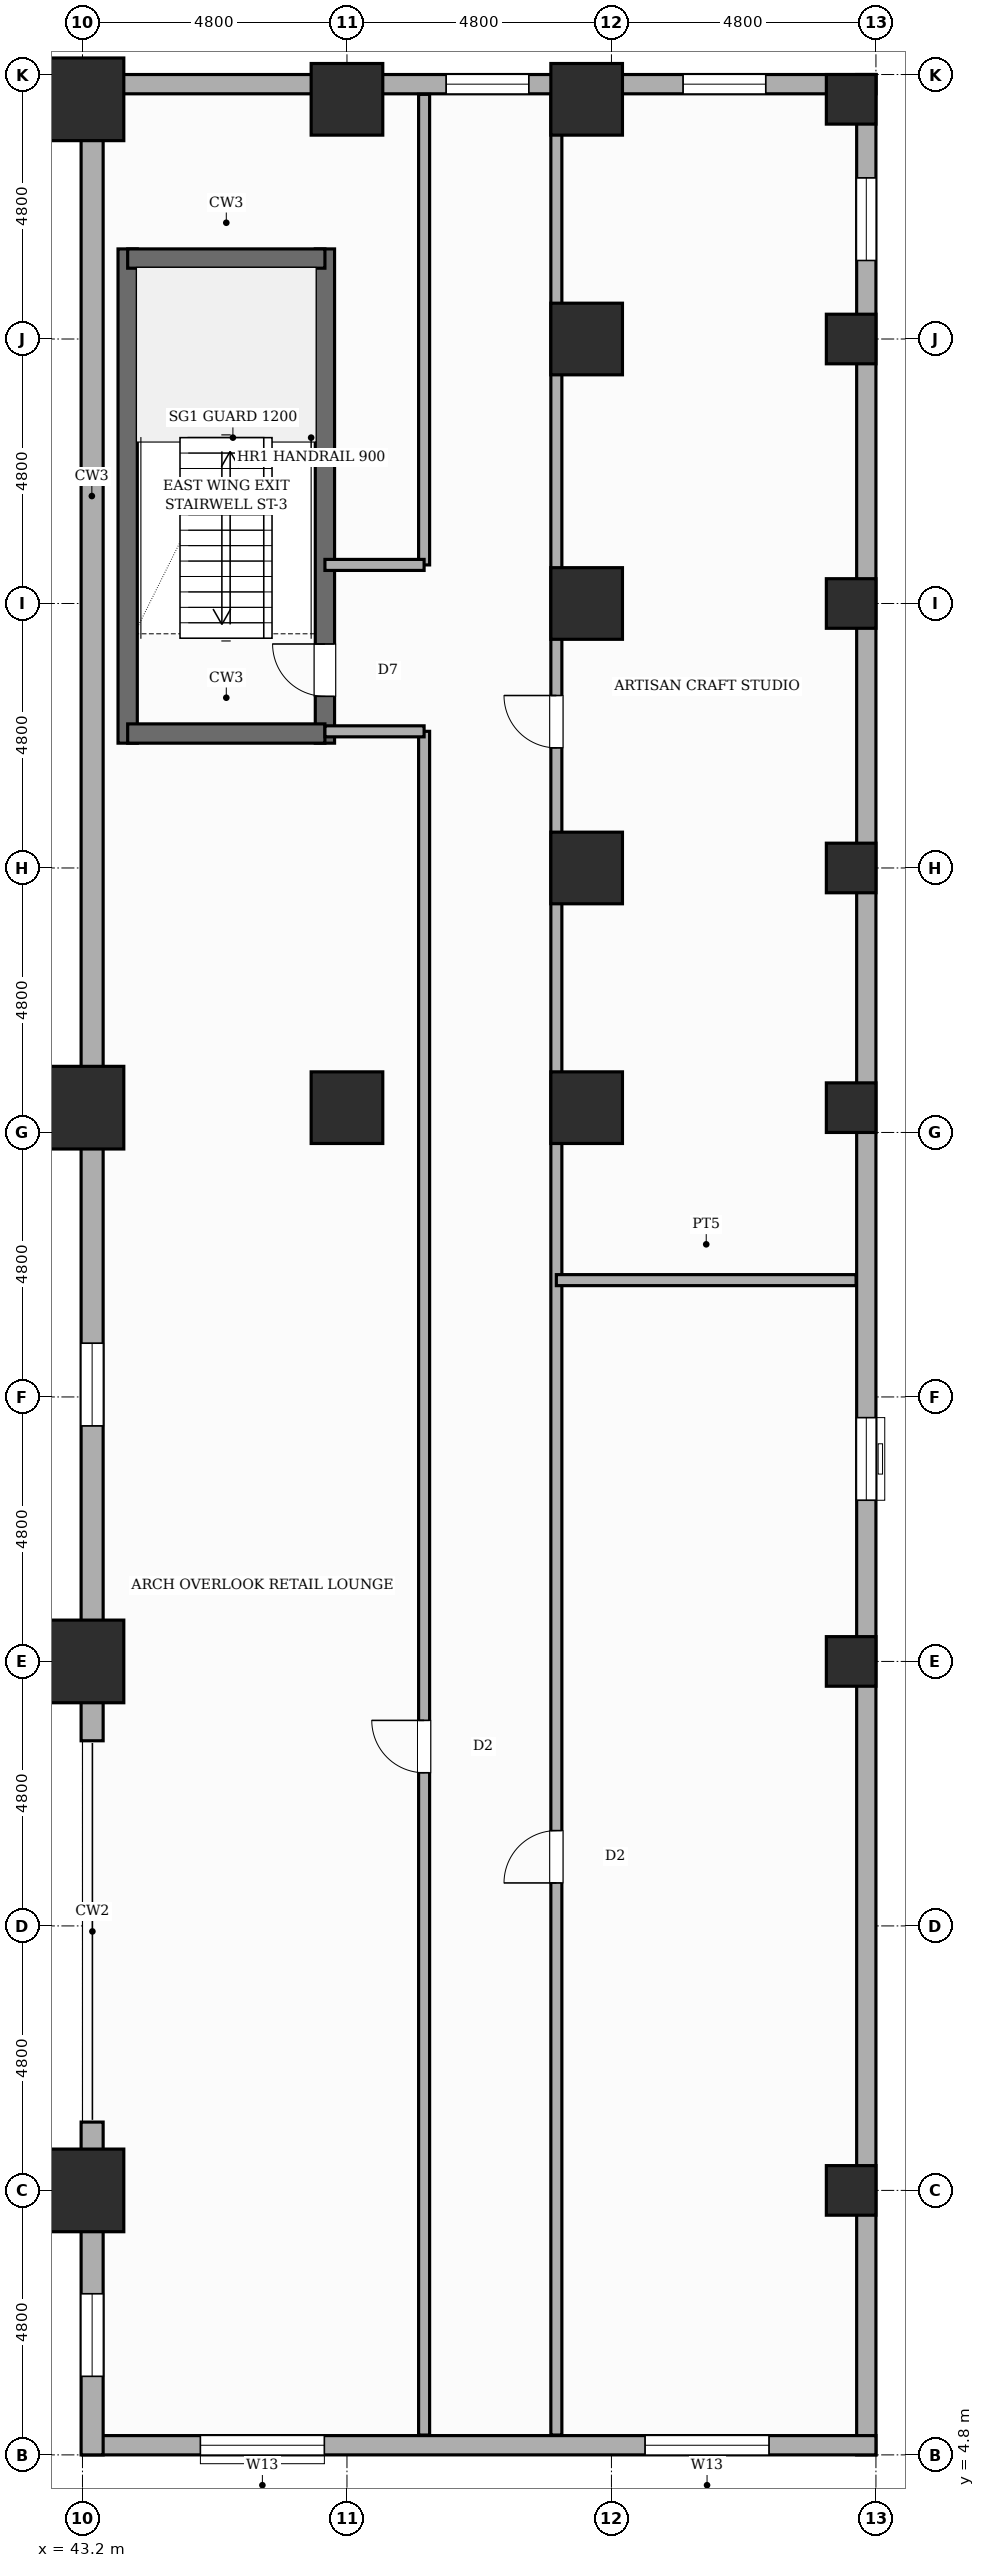
"""IFC4 building model, lengths in metres.
Left out: names, types, materials, properties, quantities, classifications, styles, units other than length and angle.
Written with IfcOpenShell. Run it as: python <this file> out.ifc"""

import sys

from ifc_helpers import new_model, si_unit, direction, frame, frame_2d, origin, origin_2d, place, context, subcontext, project, spatial, rectangle, circle, extrude, element, fill, save


model = new_model("IFC4")
c1 = context("Model", 3, precision=1e-05, world=origin(), true_north=direction((0.0, 1.0)))
c2 = subcontext(c1, "Body", "Model", "MODEL_VIEW")
j1 = project(units=[si_unit("LENGTHUNIT", "METRE"), si_unit("PLANEANGLEUNIT", "RADIAN")], contexts=[c1])
p1 = place(None, origin())
s1 = spatial("IfcSite", under=j1, at=p1, CompositionType="ELEMENT")
p2 = place(p1, origin())
s2 = spatial("IfcBuilding", under=s1, at=p2, CompositionType="ELEMENT")
p3 = place(p2, frame((0.0, 0.0, 5.2)))
s3 = spatial("IfcBuildingStorey", under=s2, at=p3, CompositionType="ELEMENT", Elevation=5.2)
p4 = place(p3, frame((44.02, 35.865, 0.0), z_axis=(0.0, 0.0, 1.0), x_axis=(0.0, 1.0, 0.0)))
e1 = element("IfcWall", 1, at=p4, inside=s3, PredefinedType="SHEAR", context=c2, shape_type="SweptSolid", body=[
    extrude(rectangle(XDim=8.97, YDim=0.35, at=frame_2d((4.485, 0.0))), origin(), (0.0, 0.0, 1.0), 4.8),
])
p5 = place(p3, frame((47.6, 35.865, 0.0), z_axis=(0.0, 0.0, 1.0), x_axis=(0.0, 1.0, 0.0)))
e2 = element("IfcWall", 2, at=p5, inside=s3, PredefinedType="SHEAR", context=c2, shape_type="SweptSolid", body=[
    extrude(rectangle(XDim=8.97, YDim=0.35, at=frame_2d((4.485, 0.0))), origin(), (0.0, 0.0, 1.0), 4.8),
])
p6 = place(p5, frame((0.85, 0.0, 0.0)))
e3 = element("IfcOpeningElement", 3, at=p6, cuts=e2, PredefinedType="OPENING", context=c2, shape_type="SweptSolid", body=[
    extrude(rectangle(XDim=0.95, YDim=2.1, at=frame_2d((0.475, 1.05))), frame((0.0, 0.185, 0.0), z_axis=(0.0, -1.0, 0.0), x_axis=(1.0, 0.0, 0.0)), (0.0, 0.0, 1.0), 0.37),
])
for number, where, z_axis, x_axis in (
    (4, (44.02, 36.04, 0.0), (0.0, 0.0, 1.0), (1.0, 0.0, 0.0)),
    (5, (44.02, 44.66, 0.0), (0.0, 0.0, 1.0), (1.0, 0.0, 0.0)),
):
    element("IfcWall", number, at=place(p3, frame(where, z_axis=z_axis, x_axis=x_axis)), inside=s3, PredefinedType="SHEAR", context=c2, shape_type="SweptSolid", body=[
        extrude(rectangle(XDim=3.58, YDim=0.35, at=frame_2d((1.79, 0.0))), origin(), (0.0, 0.0, 1.0), 4.8),
    ])
for number, where, z_axis, x_axis in (
    (6, (43.2, 9.6, 0.0), (0.0, 0.0, 1.0), (1.0, 0.0, 0.0)),
    (7, (43.2, 19.2, 0.0), (0.0, 0.0, 1.0), (1.0, 0.0, 0.0)),
    (8, (43.2, 29.25, 0.0), (0.0, 0.0, 1.0), (1.0, 0.0, 0.0)),
    (9, (43.2, 47.55, 0.0), (0.0, 0.0, 1.0), (1.0, 0.0, 0.0)),
):
    element("IfcColumn", number, at=place(p3, frame(where, z_axis=z_axis, x_axis=x_axis)), inside=s3, PredefinedType="USERDEFINED", context=c2, shape_type="SweptSolid", body=[
        extrude(rectangle(XDim=1.5, YDim=1.5, at=origin_2d()), origin(), (0.0, 0.0, 1.0), 4.8),
    ])
for number, where, z_axis, x_axis in (
    (10, (48.0, 29.25, 0.0), (0.0, 0.0, 1.0), (1.0, 0.0, 0.0)),
    (11, (48.0, 47.55, 0.0), (0.0, 0.0, 1.0), (1.0, 0.0, 0.0)),
    (12, (52.35, 29.25, 0.0), (0.0, 0.0, 1.0), (1.0, 0.0, 0.0)),
    (13, (52.35, 33.6, 0.0), (0.0, 0.0, 1.0), (1.0, 0.0, 0.0)),
    (14, (52.35, 38.4, 0.0), (0.0, 0.0, 1.0), (1.0, 0.0, 0.0)),
    (15, (52.35, 43.2, 0.0), (0.0, 0.0, 1.0), (1.0, 0.0, 0.0)),
    (16, (52.35, 47.55, 0.0), (0.0, 0.0, 1.0), (1.0, 0.0, 0.0)),
):
    element("IfcColumn", number, at=place(p3, frame(where, z_axis=z_axis, x_axis=x_axis)), inside=s3, PredefinedType="COLUMN", context=c2, shape_type="SweptSolid", body=[
        extrude(rectangle(XDim=1.3, YDim=1.3, at=origin_2d()), origin(), (0.0, 0.0, 1.0), 4.8),
    ])
for number, where, z_axis, x_axis in (
    (17, (57.15, 9.6, 0.0), (0.0, 0.0, 1.0), (1.0, 0.0, 0.0)),
    (18, (57.15, 19.2, 0.0), (0.0, 0.0, 1.0), (1.0, 0.0, 0.0)),
    (19, (57.15, 29.25, 0.0), (0.0, 0.0, 1.0), (1.0, 0.0, 0.0)),
    (20, (57.15, 33.6, 0.0), (0.0, 0.0, 1.0), (1.0, 0.0, 0.0)),
    (21, (57.15, 38.4, 0.0), (0.0, 0.0, 1.0), (1.0, 0.0, 0.0)),
    (22, (57.15, 43.2, 0.0), (0.0, 0.0, 1.0), (1.0, 0.0, 0.0)),
    (23, (57.15, 47.55, 0.0), (0.0, 0.0, 1.0), (1.0, 0.0, 0.0)),
):
    element("IfcColumn", number, at=place(p3, frame(where, z_axis=z_axis, x_axis=x_axis)), inside=s3, PredefinedType="COLUMN", context=c2, shape_type="SweptSolid", body=[
        extrude(circle(Radius=0.45, at=origin_2d()), origin(), (0.0, 0.0, 1.0), 4.8),
    ])
p7 = place(p3, frame((43.2, 47.825, 0.0), z_axis=(0.0, 0.0, 1.0), x_axis=(1.0, 0.0, 0.0)))
e24 = element("IfcWall", 24, at=p7, inside=s3, PredefinedType="STANDARD", context=c2, shape_type="SweptSolid", body=[
    extrude(rectangle(XDim=14.4, YDim=0.35, at=frame_2d((7.2, 0.0))), origin(), (0.0, 0.0, 1.0), 3.6),
])
p8 = place(p7, frame((6.6, 0.0, 0.85)))
e25 = element("IfcOpeningElement", 25, at=p8, cuts=e24, PredefinedType="OPENING", context=c2, shape_type="SweptSolid", body=[
    extrude(rectangle(XDim=1.5, YDim=2.1, at=frame_2d((0.75, 1.05))), frame((0.0, 0.185, 0.0), z_axis=(0.0, -1.0, 0.0), x_axis=(1.0, 0.0, 0.0)), (0.0, 0.0, 1.0), 0.37),
])
p9 = place(p7, frame((10.9, 0.0, 0.85)))
e26 = element("IfcOpeningElement", 26, at=p9, cuts=e24, PredefinedType="OPENING", context=c2, shape_type="SweptSolid", body=[
    extrude(rectangle(XDim=1.5, YDim=2.1, at=frame_2d((0.75, 1.05))), frame((0.0, 0.185, 0.0), z_axis=(0.0, -1.0, 0.0), x_axis=(1.0, 0.0, 0.0)), (0.0, 0.0, 1.0), 0.37),
])
p10 = place(p3, frame((57.425, 48.0, 0.0), z_axis=(0.0, 0.0, 1.0), x_axis=(0.0, -1.0, 0.0)))
e27 = element("IfcWall", 27, at=p10, inside=s3, PredefinedType="STANDARD", context=c2, shape_type="SweptSolid", body=[
    extrude(rectangle(XDim=43.2, YDim=0.35, at=frame_2d((21.6, 0.0))), origin(), (0.0, 0.0, 1.0), 3.6),
])
p11 = place(p10, frame((24.375, 0.0, 0.85)))
e28 = element("IfcOpeningElement", 28, at=p11, cuts=e27, PredefinedType="OPENING", context=c2, shape_type="SweptSolid", body=[
    extrude(rectangle(XDim=1.5, YDim=2.1, at=frame_2d((0.75, 1.05))), frame((0.0, 0.185, 0.0), z_axis=(0.0, -1.0, 0.0), x_axis=(1.0, 0.0, 0.0)), (0.0, 0.0, 1.0), 0.37),
])
p12 = place(p10, frame((1.875, 0.0, 0.85)))
e29 = element("IfcOpeningElement", 29, at=p12, cuts=e27, PredefinedType="OPENING", context=c2, shape_type="SweptSolid", body=[
    extrude(rectangle(XDim=1.5, YDim=2.1, at=frame_2d((0.75, 1.05))), frame((0.0, 0.185, 0.0), z_axis=(0.0, -1.0, 0.0), x_axis=(1.0, 0.0, 0.0)), (0.0, 0.0, 1.0), 0.37),
])
p13 = place(p3, frame((57.6, 4.975, 0.0), z_axis=(0.0, 0.0, 1.0), x_axis=(-1.0, 0.0, 0.0)))
e30 = element("IfcWall", 30, at=p13, inside=s3, PredefinedType="STANDARD", context=c2, shape_type="SweptSolid", body=[
    extrude(rectangle(XDim=14.4, YDim=0.35, at=frame_2d((7.2, 0.0))), origin(), (0.0, 0.0, 1.0), 4.52),
])
p14 = place(p13, frame((1.94, 0.0, 0.85)))
e31 = element("IfcOpeningElement", 31, at=p14, cuts=e30, PredefinedType="OPENING", context=c2, shape_type="SweptSolid", body=[
    extrude(rectangle(XDim=2.25, YDim=2.85, at=frame_2d((1.125, 1.425))), frame((0.0, 0.185, 0.0), z_axis=(0.0, -1.0, 0.0), x_axis=(1.0, 0.0, 0.0)), (0.0, 0.0, 1.0), 0.37),
])
p15 = place(p13, frame((10.01, 0.0, 0.85)))
e32 = element("IfcOpeningElement", 32, at=p15, cuts=e30, PredefinedType="OPENING", context=c2, shape_type="SweptSolid", body=[
    extrude(rectangle(XDim=2.25, YDim=2.85, at=frame_2d((1.125, 1.425))), frame((0.0, 0.185, 0.0), z_axis=(0.0, -1.0, 0.0), x_axis=(1.0, 0.0, 0.0)), (0.0, 0.0, 1.0), 0.37),
])
p16 = place(p3, frame((43.375, 4.8, 0.0), z_axis=(0.0, 0.0, 1.0), x_axis=(0.0, 1.0, 0.0)))
e33 = element("IfcWall", 33, at=p16, inside=s3, PredefinedType="SOLIDWALL", context=c2, shape_type="SweptSolid", body=[
    extrude(rectangle(XDim=6.04, YDim=0.4, at=frame_2d((3.02, 0.0))), origin(), (0.0, 0.0, 1.0), 3.6),
])
p17 = place(p16, frame((1.425, 0.0, 0.85)))
e34 = element("IfcOpeningElement", 34, at=p17, cuts=e33, PredefinedType="OPENING", context=c2, shape_type="SweptSolid", body=[
    extrude(rectangle(XDim=1.5, YDim=2.1, at=frame_2d((0.75, 1.05))), frame((0.0, 0.21, 0.0), z_axis=(0.0, -1.0, 0.0), x_axis=(1.0, 0.0, 0.0)), (0.0, 0.0, 1.0), 0.42),
])
p18 = place(p3, frame((43.375, 17.76, 0.0), z_axis=(0.0, 0.0, 1.0), x_axis=(0.0, 1.0, 0.0)))
e35 = element("IfcWall", 35, at=p18, inside=s3, PredefinedType="SOLIDWALL", context=c2, shape_type="SweptSolid", body=[
    extrude(rectangle(XDim=30.24, YDim=0.4, at=frame_2d((15.12, 0.0))), origin(), (0.0, 0.0, 1.0), 3.6),
])
p19 = place(p18, frame((5.715, 0.0, 0.85)))
e36 = element("IfcOpeningElement", 36, at=p19, cuts=e35, PredefinedType="OPENING", context=c2, shape_type="SweptSolid", body=[
    extrude(rectangle(XDim=1.5, YDim=2.1, at=frame_2d((0.75, 1.05))), frame((0.0, 0.21, 0.0), z_axis=(0.0, -1.0, 0.0), x_axis=(1.0, 0.0, 0.0)), (0.0, 0.0, 1.0), 0.42),
])
p20 = place(p3, frame((49.4, 5.16, 0.0), z_axis=(0.0, 0.0, 1.0), x_axis=(0.0, 1.0, 0.0)))
e37 = element("IfcWall", 37, at=p20, inside=s3, PredefinedType="PARTITIONING", context=c2, shape_type="SweptSolid", body=[
    extrude(rectangle(XDim=30.92, YDim=0.2, at=frame_2d((15.46, 0.0))), origin(), (0.0, 0.0, 1.0), 4.52),
])
p21 = place(p20, frame((12.02, 0.0, 0.0)))
e38 = element("IfcOpeningElement", 38, at=p21, cuts=e37, PredefinedType="OPENING", context=c2, shape_type="SweptSolid", body=[
    extrude(rectangle(XDim=0.95, YDim=2.15, at=frame_2d((0.475, 1.075))), frame((0.0, 0.11, 0.0), z_axis=(0.0, -1.0, 0.0), x_axis=(1.0, 0.0, 0.0)), (0.0, 0.0, 1.0), 0.22),
])
p22 = place(p3, frame((49.4, 39.1, 0.0), z_axis=(0.0, 0.0, 1.0), x_axis=(0.0, 1.0, 0.0)))
e39 = element("IfcWall", 39, at=p22, inside=s3, PredefinedType="PARTITIONING", context=c2, shape_type="SweptSolid", body=[
    extrude(rectangle(XDim=8.54, YDim=0.2, at=frame_2d((4.27, 0.0))), origin(), (0.0, 0.0, 1.0), 4.52),
])
for number, where, z_axis, x_axis in (
    (40, (47.6, 36.08, 0.0), (0.0, 0.0, 1.0), (1.0, 0.0, 0.0)),
    (41, (47.6, 39.1, 0.0), (0.0, 0.0, 1.0), (1.0, 0.0, 0.0)),
):
    element("IfcWall", number, at=place(p3, frame(where, z_axis=z_axis, x_axis=x_axis)), inside=s3, PredefinedType="PARTITIONING", context=c2, shape_type="SweptSolid", body=[
        extrude(rectangle(XDim=1.8, YDim=0.2, at=frame_2d((0.9, 0.0))), origin(), (0.0, 0.0, 1.0), 4.52),
    ])
p23 = place(p3, frame((51.8, 5.16, 0.0), z_axis=(0.0, 0.0, 1.0), x_axis=(0.0, 1.0, 0.0)))
e42 = element("IfcWall", 42, at=p23, inside=s3, PredefinedType="PARTITIONING", context=c2, shape_type="SweptSolid", body=[
    extrude(rectangle(XDim=42.48, YDim=0.2, at=frame_2d((21.24, 0.0))), origin(), (0.0, 0.0, 1.0), 4.52),
])
p24 = place(p23, frame((10.02, 0.0, 0.0)))
e43 = element("IfcOpeningElement", 43, at=p24, cuts=e42, PredefinedType="OPENING", context=c2, shape_type="SweptSolid", body=[
    extrude(rectangle(XDim=0.95, YDim=2.15, at=frame_2d((0.475, 1.075))), frame((0.0, 0.11, 0.0), z_axis=(0.0, -1.0, 0.0), x_axis=(1.0, 0.0, 0.0)), (0.0, 0.0, 1.0), 0.22),
])
p25 = place(p23, frame((30.62, 0.0, 0.0)))
e44 = element("IfcOpeningElement", 44, at=p25, cuts=e42, PredefinedType="OPENING", context=c2, shape_type="SweptSolid", body=[
    extrude(rectangle(XDim=0.95, YDim=2.15, at=frame_2d((0.475, 1.075))), frame((0.0, 0.11, 0.0), z_axis=(0.0, -1.0, 0.0), x_axis=(1.0, 0.0, 0.0)), (0.0, 0.0, 1.0), 0.22),
])
p26 = place(p3, frame((51.8, 26.12, 0.0), z_axis=(0.0, 0.0, 1.0), x_axis=(1.0, 0.0, 0.0)))
e45 = element("IfcWall", 45, at=p26, inside=s3, PredefinedType="SOLIDWALL", context=c2, shape_type="SweptSolid", body=[
    extrude(rectangle(XDim=5.44, YDim=0.2, at=frame_2d((2.72, 0.0))), origin(), (0.0, 0.0, 1.0), 4.52),
])
p27 = place(p8, origin())
e46 = element("IfcWindow", 46, at=p27, inside=s3, PartitioningType="SINGLE_PANEL", PredefinedType="WINDOW", context=c2, shape_type="SweptSolid", body=[
    extrude(rectangle(XDim=1.5, YDim=2.1, at=frame_2d((0.75, 1.05))), frame((0.0, 0.03, 0.0), z_axis=(0.0, -1.0, 0.0), x_axis=(1.0, 0.0, 0.0)), (0.0, 0.0, 1.0), 0.06),
])
fill(e25, e46)
p28 = place(p9, origin())
e47 = element("IfcWindow", 47, at=p28, inside=s3, PartitioningType="SINGLE_PANEL", PredefinedType="WINDOW", context=c2, shape_type="SweptSolid", body=[
    extrude(rectangle(XDim=1.5, YDim=2.1, at=frame_2d((0.75, 1.05))), frame((0.0, 0.03, 0.0), z_axis=(0.0, -1.0, 0.0), x_axis=(1.0, 0.0, 0.0)), (0.0, 0.0, 1.0), 0.06),
])
fill(e26, e47)
p29 = place(p11, origin())
e48 = element("IfcWindow", 48, at=p29, inside=s3, PartitioningType="SINGLE_PANEL", PredefinedType="WINDOW", context=c2, shape_type="SweptSolid", body=[
    extrude(rectangle(XDim=1.5, YDim=2.1, at=frame_2d((0.75, 1.05))), frame((0.0, 0.03, 0.0), z_axis=(0.0, -1.0, 0.0), x_axis=(1.0, 0.0, 0.0)), (0.0, 0.0, 1.0), 0.06),
])
fill(e28, e48)
p30 = place(p12, origin())
e49 = element("IfcWindow", 49, at=p30, inside=s3, PartitioningType="SINGLE_PANEL", PredefinedType="WINDOW", context=c2, shape_type="SweptSolid", body=[
    extrude(rectangle(XDim=1.5, YDim=2.1, at=frame_2d((0.75, 1.05))), frame((0.0, 0.03, 0.0), z_axis=(0.0, -1.0, 0.0), x_axis=(1.0, 0.0, 0.0)), (0.0, 0.0, 1.0), 0.06),
])
fill(e29, e49)
p31 = place(p14, origin())
e50 = element("IfcWindow", 50, at=p31, inside=s3, PartitioningType="SINGLE_PANEL", PredefinedType="WINDOW", context=c2, shape_type="SweptSolid", body=[
    extrude(rectangle(XDim=2.25, YDim=2.85, at=frame_2d((1.125, 1.425))), frame((0.0, 0.03, 0.0), z_axis=(0.0, -1.0, 0.0), x_axis=(1.0, 0.0, 0.0)), (0.0, 0.0, 1.0), 0.06),
])
fill(e31, e50)
p32 = place(p15, origin())
e51 = element("IfcWindow", 51, at=p32, inside=s3, PartitioningType="SINGLE_PANEL", PredefinedType="WINDOW", context=c2, shape_type="SweptSolid", body=[
    extrude(rectangle(XDim=2.25, YDim=2.85, at=frame_2d((1.125, 1.425))), frame((0.0, 0.03, 0.0), z_axis=(0.0, -1.0, 0.0), x_axis=(1.0, 0.0, 0.0)), (0.0, 0.0, 1.0), 0.06),
])
fill(e32, e51)
p33 = place(p17, origin())
e52 = element("IfcWindow", 52, at=p33, inside=s3, PartitioningType="SINGLE_PANEL", PredefinedType="WINDOW", context=c2, shape_type="SweptSolid", body=[
    extrude(rectangle(XDim=1.5, YDim=2.1, at=frame_2d((0.75, 1.05))), frame((0.0, 0.03, 0.0), z_axis=(0.0, -1.0, 0.0), x_axis=(1.0, 0.0, 0.0)), (0.0, 0.0, 1.0), 0.06),
])
fill(e34, e52)
p34 = place(p19, origin())
e53 = element("IfcWindow", 53, at=p34, inside=s3, PartitioningType="SINGLE_PANEL", PredefinedType="WINDOW", context=c2, shape_type="SweptSolid", body=[
    extrude(rectangle(XDim=1.5, YDim=2.1, at=frame_2d((0.75, 1.05))), frame((0.0, 0.03, 0.0), z_axis=(0.0, -1.0, 0.0), x_axis=(1.0, 0.0, 0.0)), (0.0, 0.0, 1.0), 0.06),
])
fill(e36, e53)
p35 = place(p6, origin())
e54 = element("IfcDoor", 54, at=p35, inside=s3, OperationType="SINGLE_SWING_RIGHT", PredefinedType="DOOR", context=c2, shape_type="SweptSolid", body=[
    extrude(rectangle(XDim=0.95, YDim=2.1, at=frame_2d((0.475, 1.05))), frame((0.0, 0.025, 0.0), z_axis=(0.0, -1.0, 0.0), x_axis=(1.0, 0.0, 0.0)), (0.0, 0.0, 1.0), 0.05),
])
fill(e3, e54)
p36 = place(p21, origin())
e55 = element("IfcDoor", 55, at=p36, inside=s3, OperationType="SINGLE_SWING_RIGHT", PredefinedType="DOOR", context=c2, shape_type="SweptSolid", body=[
    extrude(rectangle(XDim=0.95, YDim=2.15, at=frame_2d((0.475, 1.075))), frame((0.0, 0.025, 0.0), z_axis=(0.0, -1.0, 0.0), x_axis=(1.0, 0.0, 0.0)), (0.0, 0.0, 1.0), 0.05),
])
fill(e38, e55)
p37 = place(p24, origin())
e56 = element("IfcDoor", 56, at=p37, inside=s3, OperationType="SINGLE_SWING_LEFT", PredefinedType="DOOR", context=c2, shape_type="SweptSolid", body=[
    extrude(rectangle(XDim=0.95, YDim=2.15, at=frame_2d((0.475, 1.075))), frame((0.0, 0.025, 0.0), z_axis=(0.0, -1.0, 0.0), x_axis=(1.0, 0.0, 0.0)), (0.0, 0.0, 1.0), 0.05),
])
fill(e43, e56)
p38 = place(p25, origin())
e57 = element("IfcDoor", 57, at=p38, inside=s3, OperationType="SINGLE_SWING_RIGHT", PredefinedType="DOOR", context=c2, shape_type="SweptSolid", body=[
    extrude(rectangle(XDim=0.95, YDim=2.15, at=frame_2d((0.475, 1.075))), frame((0.0, 0.025, 0.0), z_axis=(0.0, -1.0, 0.0), x_axis=(1.0, 0.0, 0.0)), (0.0, 0.0, 1.0), 0.05),
])
fill(e44, e57)
save(model, sys.argv[1])
